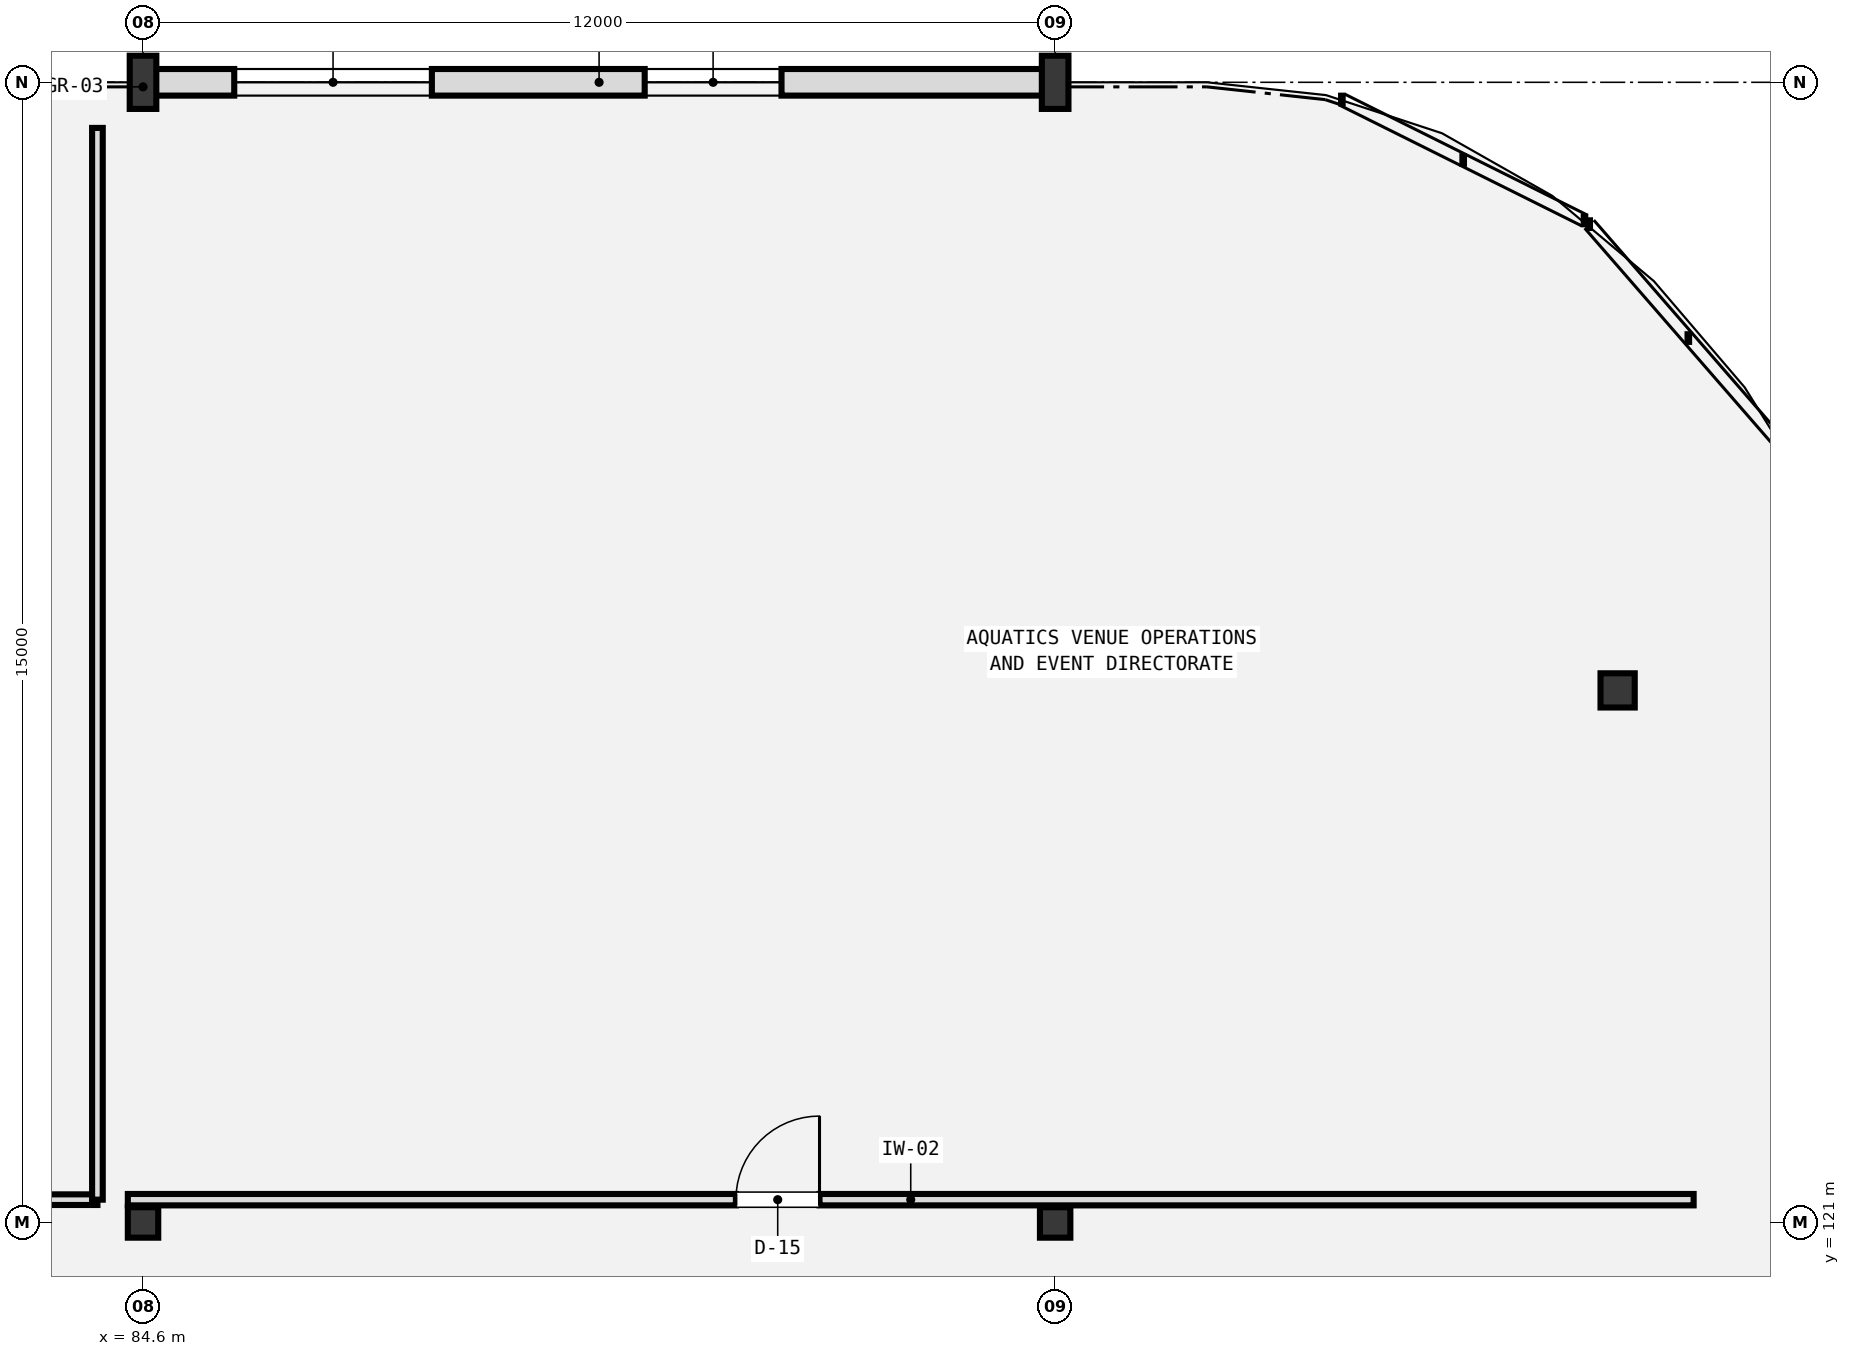
"""IFC4 building model, lengths in metres.
Left out: names, types, materials, properties, quantities, classifications, styles, units other than length and angle.
Written with IfcOpenShell. Run it as: python <this file> out.ifc"""

import sys

from ifc_helpers import new_model, si_unit, direction, frame, frame_2d, origin, origin_2d, place, context, subcontext, project, spatial, rectangle, extrude, element, fill, save


model = new_model("IFC4")
c1 = context("Model", 3, precision=1e-05, world=origin(), true_north=direction((0.0, 1.0)))
c2 = subcontext(c1, "Body", "Model", "MODEL_VIEW")
j1 = project(units=[si_unit("LENGTHUNIT", "METRE"), si_unit("PLANEANGLEUNIT", "RADIAN")], contexts=[c1])
p1 = place(None, origin())
s1 = spatial("IfcSite", under=j1, at=p1, CompositionType="ELEMENT")
p2 = place(p1, origin())
s2 = spatial("IfcBuilding", under=s1, at=p2, CompositionType="ELEMENT")
p3 = place(p2, frame((0.0, 0.0, 14.4)))
s3 = spatial("IfcBuildingStorey", under=s2, at=p3, CompositionType="ELEMENT", Elevation=14.4)
p4 = place(p3, frame((84.6, 121.0, 0.0), z_axis=(0.0, 0.0, 1.0), x_axis=(1.0, 0.0, 0.0)))
e1 = element("IfcColumn", 1, at=p4, inside=s3, PredefinedType="COLUMN", context=c2, shape_type="SweptSolid", body=[
    extrude(rectangle(XDim=0.4, YDim=0.4, at=origin_2d()), origin(), (0.0, 0.0, 1.0), 4.2),
])
p5 = place(p3, frame((84.6, 136.0, 0.0), z_axis=(0.0, 0.0, 1.0), x_axis=(1.0, 0.0, 0.0)))
e2 = element("IfcColumn", 2, at=p5, inside=s3, PredefinedType="COLUMN", context=c2, shape_type="SweptSolid", body=[
    extrude(rectangle(XDim=0.35, YDim=0.7, at=origin_2d()), origin(), (0.0, 0.0, 1.0), 4.2),
])
p6 = place(p3, frame((96.6, 121.0, 0.0), z_axis=(0.0, 0.0, 1.0), x_axis=(1.0, 0.0, 0.0)))
e3 = element("IfcColumn", 3, at=p6, inside=s3, PredefinedType="COLUMN", context=c2, shape_type="SweptSolid", body=[
    extrude(rectangle(XDim=0.4, YDim=0.4, at=origin_2d()), origin(), (0.0, 0.0, 1.0), 4.2),
])
p7 = place(p3, frame((96.6, 136.0, 0.0), z_axis=(0.0, 0.0, 1.0), x_axis=(1.0, 0.0, 0.0)))
e4 = element("IfcColumn", 4, at=p7, inside=s3, PredefinedType="COLUMN", context=c2, shape_type="SweptSolid", body=[
    extrude(rectangle(XDim=0.35, YDim=0.7, at=origin_2d()), origin(), (0.0, 0.0, 1.0), 4.2),
])
p8 = place(p3, frame((104.0, 128.0, 0.0), z_axis=(0.0, 0.0, 1.0), x_axis=(1.0, 0.0, 0.0)))
e5 = element("IfcColumn", 5, at=p8, inside=s3, PredefinedType="COLUMN", context=c2, shape_type="SweptSolid", body=[
    extrude(rectangle(XDim=0.45, YDim=0.45, at=origin_2d()), origin(), (0.0, 0.0, 1.0), 3.92),
])
p9 = place(p3, frame((84.6, 136.0, 0.0), z_axis=(0.0, 0.0, 1.0), x_axis=(1.0, 0.0, 0.0)))
e6 = element("IfcWall", 6, at=p9, inside=s3, PredefinedType="SOLIDWALL", context=c2, shape_type="SweptSolid", body=[
    extrude(rectangle(XDim=12.0, YDim=0.35, at=frame_2d((6.0, 0.0))), origin(), (0.0, 0.0, 1.0), 3.51),
])
p10 = place(p9, frame((1.2, 0.0, 0.95)))
e7 = element("IfcOpeningElement", 7, at=p10, cuts=e6, PredefinedType="OPENING", context=c2, shape_type="SweptSolid", body=[
    extrude(rectangle(XDim=2.6, YDim=1.4, at=frame_2d((1.3, 0.7))), frame((0.0, 0.185, 0.0), z_axis=(0.0, -1.0, 0.0), x_axis=(1.0, 0.0, 0.0)), (0.0, 0.0, 1.0), 0.37),
])
p11 = place(p9, frame((6.6, 0.0, 0.95)))
e8 = element("IfcOpeningElement", 8, at=p11, cuts=e6, PredefinedType="OPENING", context=c2, shape_type="SweptSolid", body=[
    extrude(rectangle(XDim=1.8, YDim=0.75, at=frame_2d((0.9, 0.375))), frame((0.0, 0.185, 0.0), z_axis=(0.0, -1.0, 0.0), x_axis=(1.0, 0.0, 0.0)), (0.0, 0.0, 1.0), 0.37),
])
p12 = place(p3, frame((62.4, 121.3, 0.0), z_axis=(0.0, 0.0, 1.0), x_axis=(1.0, 0.0, 0.0)))
e9 = element("IfcWall", 9, at=p12, inside=s3, PredefinedType="PARTITIONING", context=c2, shape_type="SweptSolid", body=[
    extrude(rectangle(XDim=21.6, YDim=0.14, at=frame_2d((10.8, 0.0))), origin(), (0.0, 0.0, 1.0), 2.75),
])
p13 = place(p12, frame((9.0, 0.0, 0.0)))
e10 = element("IfcOpeningElement", 10, at=p13, cuts=e9, PredefinedType="OPENING", context=c2, shape_type="SweptSolid", body=[
    extrude(rectangle(XDim=1.1, YDim=2.2, at=frame_2d((0.55, 1.1))), frame((0.0, 0.08, 0.0), z_axis=(0.0, -1.0, 0.0), x_axis=(1.0, 0.0, 0.0)), (0.0, 0.0, 1.0), 0.16),
])
p14 = place(p3, frame((84.0, 121.3, 0.0), z_axis=(0.0, 0.0, 1.0), x_axis=(0.0, 1.0, 0.0)))
e11 = element("IfcWall", 11, at=p14, inside=s3, PredefinedType="PARTITIONING", context=c2, shape_type="SweptSolid", body=[
    extrude(rectangle(XDim=14.1, YDim=0.14, at=frame_2d((7.05, 0.0))), origin(), (0.0, 0.0, 1.0), 2.75),
])
p15 = place(p3, frame((84.4, 121.3, 0.0), z_axis=(0.0, 0.0, 1.0), x_axis=(1.0, 0.0, 0.0)))
e12 = element("IfcWall", 12, at=p15, inside=s3, PredefinedType="PARTITIONING", context=c2, shape_type="SweptSolid", body=[
    extrude(rectangle(XDim=20.6, YDim=0.15, at=frame_2d((10.3, 0.0))), origin(), (0.0, 0.0, 1.0), 2.75),
])
p16 = place(p15, frame((8.0, 0.0, 0.0)))
e13 = element("IfcOpeningElement", 13, at=p16, cuts=e12, PredefinedType="OPENING", context=c2, shape_type="SweptSolid", body=[
    extrude(rectangle(XDim=1.1, YDim=2.2, at=frame_2d((0.55, 1.1))), frame((0.0, 0.085, 0.0), z_axis=(0.0, -1.0, 0.0), x_axis=(1.0, 0.0, 0.0)), (0.0, 0.0, 1.0), 0.17),
])
p17 = place(p10, origin())
e14 = element("IfcWindow", 14, at=p17, inside=s3, PartitioningType="DOUBLE_PANEL_VERTICAL", PredefinedType="WINDOW", context=c2, shape_type="SweptSolid", body=[
    extrude(rectangle(XDim=2.6, YDim=1.4, at=frame_2d((1.3, 0.7))), frame((0.0, 0.03, 0.0), z_axis=(0.0, -1.0, 0.0), x_axis=(1.0, 0.0, 0.0)), (0.0, 0.0, 1.0), 0.06),
])
fill(e7, e14)
p18 = place(p11, origin())
e15 = element("IfcWindow", 15, at=p18, inside=s3, PartitioningType="SINGLE_PANEL", PredefinedType="WINDOW", context=c2, shape_type="SweptSolid", body=[
    extrude(rectangle(XDim=1.8, YDim=0.75, at=frame_2d((0.9, 0.375))), frame((0.0, 0.03, 0.0), z_axis=(0.0, -1.0, 0.0), x_axis=(1.0, 0.0, 0.0)), (0.0, 0.0, 1.0), 0.06),
])
fill(e8, e15)
p19 = place(p16, origin())
e16 = element("IfcDoor", 16, at=p19, inside=s3, OperationType="SINGLE_SWING_RIGHT", PredefinedType="DOOR", context=c2, shape_type="SweptSolid", body=[
    extrude(rectangle(XDim=1.1, YDim=2.2, at=frame_2d((0.55, 1.1))), frame((0.0, 0.025, 0.0), z_axis=(0.0, -1.0, 0.0), x_axis=(1.0, 0.0, 0.0)), (0.0, 0.0, 1.0), 0.05),
])
fill(e13, e16)
save(model, sys.argv[1])
